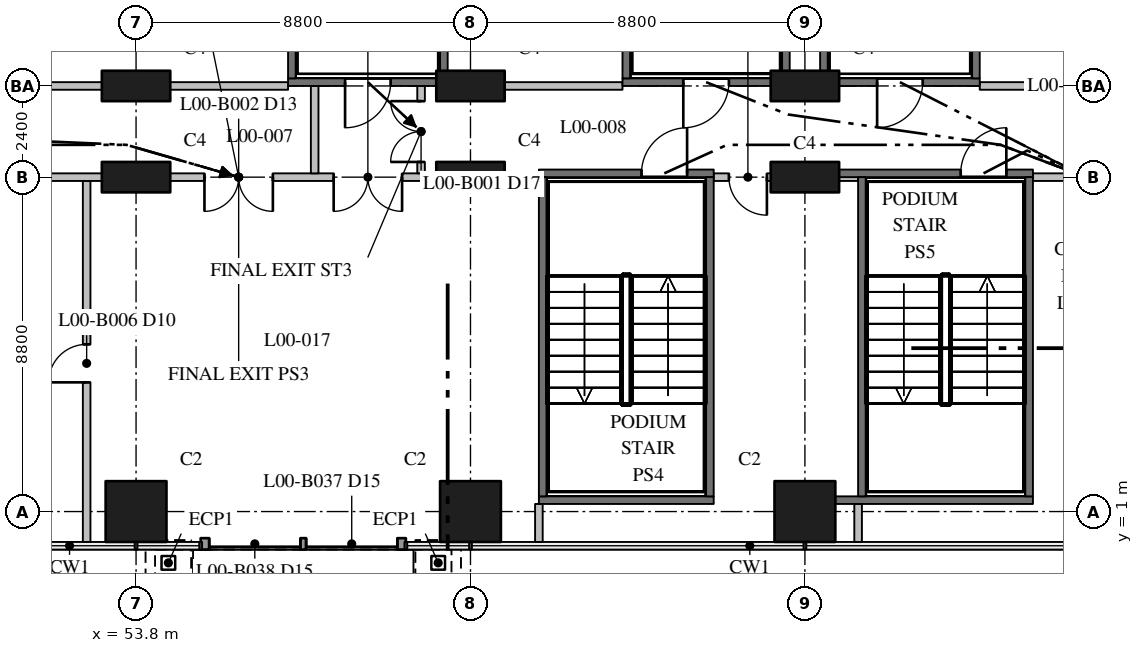
"""IFC4 building model, lengths in metres.
Left out: names, types, materials, properties, quantities, classifications, styles, units other than length and angle.
Written with IfcOpenShell. Run it as: python <this file> out.ifc"""

import sys

from ifc_helpers import new_model, si_unit, direction, frame, frame_2d, origin, origin_2d, place, context, subcontext, project, spatial, rectangle, hollow_rectangle, extrude, element, fill, save


model = new_model("IFC4")
c1 = context("Model", 3, precision=1e-05, world=origin(), true_north=direction((0.0, 1.0)))
c2 = subcontext(c1, "Body", "Model", "MODEL_VIEW")
j1 = project(units=[si_unit("LENGTHUNIT", "METRE"), si_unit("PLANEANGLEUNIT", "RADIAN")], contexts=[c1])
p1 = place(None, origin())
s1 = spatial("IfcSite", under=j1, at=p1, CompositionType="ELEMENT")
p2 = place(p1, origin())
s2 = spatial("IfcBuilding", under=s1, at=p2, CompositionType="ELEMENT")
p3 = place(p2, origin())
s3 = spatial("IfcBuildingStorey", under=s2, at=p3, CompositionType="ELEMENT", Elevation=0.0)
p4 = place(p3, frame((53.8, 1.0, 0.0), z_axis=(0.0, 0.0, 1.0), x_axis=(1.0, 0.0, 0.0)))
e1 = element("IfcColumn", 1, at=p4, inside=s3, PredefinedType="COLUMN", context=c2, shape_type="SweptSolid", body=[
    extrude(rectangle(XDim=1.6, YDim=1.6, at=origin_2d()), origin(), (0.0, 0.0, 1.0), 7.5),
])
for number, where, z_axis, x_axis in (
    (2, (53.8, 9.8, 0.0), (0.0, 0.0, 1.0), (1.0, 0.0, 0.0)),
    (3, (53.8, 12.2, 0.0), (0.0, 0.0, 1.0), (1.0, 0.0, 0.0)),
):
    element("IfcColumn", number, at=place(p3, frame(where, z_axis=z_axis, x_axis=x_axis)), inside=s3, PredefinedType="COLUMN", context=c2, shape_type="SweptSolid", body=[
        extrude(rectangle(XDim=1.8, YDim=0.8, at=origin_2d()), origin(), (0.0, 0.0, 1.0), 7.5),
    ])
p5 = place(p3, frame((62.6, 1.0, 0.0), z_axis=(0.0, 0.0, 1.0), x_axis=(1.0, 0.0, 0.0)))
e4 = element("IfcColumn", 4, at=p5, inside=s3, PredefinedType="COLUMN", context=c2, shape_type="SweptSolid", body=[
    extrude(rectangle(XDim=1.6, YDim=1.6, at=origin_2d()), origin(), (0.0, 0.0, 1.0), 7.5),
])
for number, where, z_axis, x_axis in (
    (5, (62.6, 9.8, 0.0), (0.0, 0.0, 1.0), (1.0, 0.0, 0.0)),
    (6, (62.6, 12.2, 0.0), (0.0, 0.0, 1.0), (1.0, 0.0, 0.0)),
):
    element("IfcColumn", number, at=place(p3, frame(where, z_axis=z_axis, x_axis=x_axis)), inside=s3, PredefinedType="COLUMN", context=c2, shape_type="SweptSolid", body=[
        extrude(rectangle(XDim=1.8, YDim=0.8, at=origin_2d()), origin(), (0.0, 0.0, 1.0), 7.5),
    ])
p6 = place(p3, frame((71.4, 1.0, 0.0), z_axis=(0.0, 0.0, 1.0), x_axis=(1.0, 0.0, 0.0)))
e7 = element("IfcColumn", 7, at=p6, inside=s3, PredefinedType="COLUMN", context=c2, shape_type="SweptSolid", body=[
    extrude(rectangle(XDim=1.6, YDim=1.6, at=origin_2d()), origin(), (0.0, 0.0, 1.0), 7.5),
])
for number, where, z_axis, x_axis in (
    (8, (71.4, 9.8, 0.0), (0.0, 0.0, 1.0), (1.0, 0.0, 0.0)),
    (9, (71.4, 12.2, 0.0), (0.0, 0.0, 1.0), (1.0, 0.0, 0.0)),
):
    element("IfcColumn", number, at=place(p3, frame(where, z_axis=z_axis, x_axis=x_axis)), inside=s3, PredefinedType="COLUMN", context=c2, shape_type="SweptSolid", body=[
        extrude(rectangle(XDim=1.8, YDim=0.8, at=origin_2d()), origin(), (0.0, 0.0, 1.0), 7.5),
    ])
for number, where, z_axis, x_axis in (
    (10, (54.65, -0.35, 0.0), (0.0, 0.0, 1.0), (1.0, 0.0, 0.0)),
    (11, (61.75, -0.35, 0.0), (0.0, 0.0, 1.0), (1.0, 0.0, 0.0)),
):
    element("IfcColumn", number, at=place(p3, frame(where, z_axis=z_axis, x_axis=x_axis)), inside=s3, PredefinedType="COLUMN", context=c2, shape_type="SweptSolid", body=[
        extrude(hollow_rectangle(XDim=0.356, YDim=0.356, WallThickness=0.013, at=origin_2d()), origin(), (0.0, 0.0, 1.0), 7.1),
    ])
p7 = place(p3, frame((57.8, 12.3, 0.0), z_axis=(0.0, 0.0, 1.0), x_axis=(1.0, 0.0, 0.0)))
e12 = element("IfcWall", 12, at=p7, inside=s3, PredefinedType="SHEAR", context=c2, shape_type="SweptSolid", body=[
    extrude(rectangle(XDim=4.2, YDim=0.2, at=frame_2d((2.1, 0.0))), origin(), (0.0, 0.0, 1.0), 7.1),
])
p8 = place(p7, frame((1.5, 0.0, 0.0)))
e13 = element("IfcOpeningElement", 13, at=p8, cuts=e12, PredefinedType="OPENING", context=c2, shape_type="SweptSolid", body=[
    extrude(rectangle(XDim=1.2, YDim=2.1, at=frame_2d((0.6, 1.05))), frame((0.0, 0.11, 0.0), z_axis=(0.0, -1.0, 0.0), x_axis=(1.0, 0.0, 0.0)), (0.0, 0.0, 1.0), 0.22),
])
p9 = place(p3, frame((57.9, 12.4, 0.0), z_axis=(0.0, 0.0, 1.0), x_axis=(0.0, 1.0, 0.0)))
e14 = element("IfcWall", 14, at=p9, inside=s3, PredefinedType="SHEAR", context=c2, shape_type="SweptSolid", body=[
    extrude(rectangle(XDim=7.2, YDim=0.2, at=frame_2d((3.6, 0.0))), origin(), (0.0, 0.0, 1.0), 7.1),
])
p10 = place(p3, frame((61.9, 12.4, 0.0), z_axis=(0.0, 0.0, 1.0), x_axis=(0.0, 1.0, 0.0)))
e15 = element("IfcWall", 15, at=p10, inside=s3, PredefinedType="SHEAR", context=c2, shape_type="SweptSolid", body=[
    extrude(rectangle(XDim=7.8, YDim=0.2, at=frame_2d((3.9, 0.0))), origin(), (0.0, 0.0, 1.0), 7.1),
])
p11 = place(p3, frame((71.8, 12.3, 0.0), z_axis=(0.0, 0.0, 1.0), x_axis=(1.0, 0.0, 0.0)))
e16 = element("IfcWall", 16, at=p11, inside=s3, PredefinedType="SHEAR", context=c2, shape_type="SweptSolid", body=[
    extrude(rectangle(XDim=4.2, YDim=0.2, at=frame_2d((2.1, 0.0))), origin(), (0.0, 0.0, 1.0), 7.1),
])
p12 = place(p11, frame((1.5, 0.0, 0.0)))
e17 = element("IfcOpeningElement", 17, at=p12, cuts=e16, PredefinedType="OPENING", context=c2, shape_type="SweptSolid", body=[
    extrude(rectangle(XDim=1.2, YDim=2.1, at=frame_2d((0.6, 1.05))), frame((0.0, 0.11, 0.0), z_axis=(0.0, -1.0, 0.0), x_axis=(1.0, 0.0, 0.0)), (0.0, 0.0, 1.0), 0.22),
])
p13 = place(p3, frame((71.9, 12.4, 0.0), z_axis=(0.0, 0.0, 1.0), x_axis=(0.0, 1.0, 0.0)))
e18 = element("IfcWall", 18, at=p13, inside=s3, PredefinedType="SHEAR", context=c2, shape_type="SweptSolid", body=[
    extrude(rectangle(XDim=7.8, YDim=0.2, at=frame_2d((3.9, 0.0))), origin(), (0.0, 0.0, 1.0), 7.1),
])
p14 = place(p3, frame((75.9, 12.4, 0.0), z_axis=(0.0, 0.0, 1.0), x_axis=(0.0, 1.0, 0.0)))
e19 = element("IfcWall", 19, at=p14, inside=s3, PredefinedType="SHEAR", context=c2, shape_type="SweptSolid", body=[
    extrude(rectangle(XDim=7.2, YDim=0.2, at=frame_2d((3.6, 0.0))), origin(), (0.0, 0.0, 1.0), 7.1),
])
p15 = place(p3, frame((66.6, 12.3, 0.0), z_axis=(0.0, 0.0, 1.0), x_axis=(1.0, 0.0, 0.0)))
e20 = element("IfcWall", 20, at=p15, inside=s3, PredefinedType="SHEAR", context=c2, shape_type="SweptSolid", body=[
    extrude(rectangle(XDim=4.4, YDim=0.2, at=frame_2d((2.2, 0.0))), origin(), (0.0, 0.0, 1.0), 7.1),
])
p16 = place(p15, frame((1.6, 0.0, 0.0)))
e21 = element("IfcOpeningElement", 21, at=p16, cuts=e20, PredefinedType="OPENING", context=c2, shape_type="SweptSolid", body=[
    extrude(rectangle(XDim=1.2, YDim=2.1, at=frame_2d((0.6, 1.05))), frame((0.0, 0.11, 0.0), z_axis=(0.0, -1.0, 0.0), x_axis=(1.0, 0.0, 0.0)), (0.0, 0.0, 1.0), 0.22),
])
for number, where, z_axis, x_axis in (
    (22, (66.7, 12.4, 0.0), (0.0, 0.0, 1.0), (0.0, 1.0, 0.0)),
    (23, (70.9, 12.4, 0.0), (0.0, 0.0, 1.0), (0.0, 1.0, 0.0)),
):
    element("IfcWall", number, at=place(p3, frame(where, z_axis=z_axis, x_axis=x_axis)), inside=s3, PredefinedType="SHEAR", context=c2, shape_type="SweptSolid", body=[
        extrude(rectangle(XDim=8.4, YDim=0.2, at=frame_2d((4.2, 0.0))), origin(), (0.0, 0.0, 1.0), 7.1),
    ])
p17 = place(p3, frame((64.4, 9.9, 0.0), z_axis=(0.0, 0.0, 1.0), x_axis=(1.0, 0.0, 0.0)))
e24 = element("IfcWall", 24, at=p17, inside=s3, PredefinedType="SHEAR", context=c2, shape_type="SweptSolid", body=[
    extrude(rectangle(XDim=4.6, YDim=0.2, at=frame_2d((2.3, 0.0))), origin(), (0.0, 0.0, 1.0), 7.1),
])
p18 = place(p17, frame((2.7, 0.0, 0.0)))
e25 = element("IfcOpeningElement", 25, at=p18, cuts=e24, PredefinedType="OPENING", context=c2, shape_type="SweptSolid", body=[
    extrude(rectangle(XDim=1.2, YDim=2.1, at=frame_2d((0.6, 1.05))), frame((0.0, 0.11, 0.0), z_axis=(0.0, -1.0, 0.0), x_axis=(1.0, 0.0, 0.0)), (0.0, 0.0, 1.0), 0.22),
])
p19 = place(p3, frame((64.4, 1.3, 0.0), z_axis=(0.0, 0.0, 1.0), x_axis=(1.0, 0.0, 0.0)))
e26 = element("IfcWall", 26, at=p19, inside=s3, PredefinedType="SHEAR", context=c2, shape_type="SweptSolid", body=[
    extrude(rectangle(XDim=4.6, YDim=0.2, at=frame_2d((2.3, 0.0))), origin(), (0.0, 0.0, 1.0), 7.1),
])
for number, where, z_axis, x_axis in (
    (27, (64.5, 1.4, 0.0), (0.0, 0.0, 1.0), (0.0, 1.0, 0.0)),
    (28, (68.9, 1.4, 0.0), (0.0, 0.0, 1.0), (0.0, 1.0, 0.0)),
):
    element("IfcWall", number, at=place(p3, frame(where, z_axis=z_axis, x_axis=x_axis)), inside=s3, PredefinedType="SHEAR", context=c2, shape_type="SweptSolid", body=[
        extrude(rectangle(XDim=8.4, YDim=0.2, at=frame_2d((4.2, 0.0))), origin(), (0.0, 0.0, 1.0), 7.1),
    ])
p20 = place(p3, frame((72.3, 9.9, 0.0), z_axis=(0.0, 0.0, 1.0), x_axis=(1.0, 0.0, 0.0)))
e29 = element("IfcWall", 29, at=p20, inside=s3, PredefinedType="SHEAR", context=c2, shape_type="SweptSolid", body=[
    extrude(rectangle(XDim=5.1, YDim=0.2, at=frame_2d((2.55, 0.0))), origin(), (0.0, 0.0, 1.0), 7.1),
])
p21 = place(p20, frame((3.2, 0.0, 0.0)))
e30 = element("IfcOpeningElement", 30, at=p21, cuts=e29, PredefinedType="OPENING", context=c2, shape_type="SweptSolid", body=[
    extrude(rectangle(XDim=1.2, YDim=2.1, at=frame_2d((0.6, 1.05))), frame((0.0, 0.11, 0.0), z_axis=(0.0, -1.0, 0.0), x_axis=(1.0, 0.0, 0.0)), (0.0, 0.0, 1.0), 0.22),
])
p22 = place(p3, frame((72.2, 1.3, 0.0), z_axis=(0.0, 0.0, 1.0), x_axis=(1.0, 0.0, 0.0)))
e31 = element("IfcWall", 31, at=p22, inside=s3, PredefinedType="SHEAR", context=c2, shape_type="SweptSolid", body=[
    extrude(rectangle(XDim=5.2, YDim=0.2, at=frame_2d((2.6, 0.0))), origin(), (0.0, 0.0, 1.0), 7.1),
])
for number, where, z_axis, x_axis in (
    (32, (72.9, 1.4, 0.0), (0.0, 0.0, 1.0), (0.0, 1.0, 0.0)),
    (33, (77.3, 1.4, 0.0), (0.0, 0.0, 1.0), (0.0, 1.0, 0.0)),
):
    element("IfcWall", number, at=place(p3, frame(where, z_axis=z_axis, x_axis=x_axis)), inside=s3, PredefinedType="SHEAR", context=c2, shape_type="SweptSolid", body=[
        extrude(rectangle(XDim=8.4, YDim=0.2, at=frame_2d((4.2, 0.0))), origin(), (0.0, 0.0, 1.0), 7.1),
    ])
p23 = place(p3, frame((45.0, 9.8, 0.0), z_axis=(0.0, 0.0, 1.0), x_axis=(1.0, 0.0, 0.0)))
e34 = element("IfcWall", 34, at=p23, inside=s3, PredefinedType="PARTITIONING", context=c2, shape_type="SweptSolid", body=[
    extrude(rectangle(XDim=19.4, YDim=0.2, at=frame_2d((9.7, 0.0))), origin(), (0.0, 0.0, 1.0), 7.1),
])
p24 = place(p23, frame((10.6, 0.0, 0.0)))
e35 = element("IfcOpeningElement", 35, at=p24, cuts=e34, PredefinedType="OPENING", context=c2, shape_type="SweptSolid", body=[
    extrude(rectangle(XDim=1.8, YDim=2.1, at=frame_2d((0.9, 1.05))), frame((0.0, 0.11, 0.0), z_axis=(0.0, -1.0, 0.0), x_axis=(1.0, 0.0, 0.0)), (0.0, 0.0, 1.0), 0.22),
])
p25 = place(p23, frame((14.0, 0.0, 0.0)))
e36 = element("IfcOpeningElement", 36, at=p25, cuts=e34, PredefinedType="OPENING", context=c2, shape_type="SweptSolid", body=[
    extrude(rectangle(XDim=1.8, YDim=2.1, at=frame_2d((0.9, 1.05))), frame((0.0, 0.11, 0.0), z_axis=(0.0, -1.0, 0.0), x_axis=(1.0, 0.0, 0.0)), (0.0, 0.0, 1.0), 0.22),
])
p26 = place(p3, frame((69.0, 9.8, 0.0), z_axis=(0.0, 0.0, 1.0), x_axis=(1.0, 0.0, 0.0)))
e37 = element("IfcWall", 37, at=p26, inside=s3, PredefinedType="PARTITIONING", context=c2, shape_type="SweptSolid", body=[
    extrude(rectangle(XDim=3.8, YDim=0.2, at=frame_2d((1.9, 0.0))), origin(), (0.0, 0.0, 1.0), 7.1),
])
p27 = place(p26, frame((0.4, 0.0, 0.0)))
e38 = element("IfcOpeningElement", 38, at=p27, cuts=e37, PredefinedType="OPENING", context=c2, shape_type="SweptSolid", body=[
    extrude(rectangle(XDim=1.0, YDim=2.1, at=frame_2d((0.5, 1.05))), frame((0.0, 0.11, 0.0), z_axis=(0.0, -1.0, 0.0), x_axis=(1.0, 0.0, 0.0)), (0.0, 0.0, 1.0), 0.22),
])
p28 = place(p3, frame((77.4, 9.8, 0.0), z_axis=(0.0, 0.0, 1.0), x_axis=(1.0, 0.0, 0.0)))
e39 = element("IfcWall", 39, at=p28, inside=s3, PredefinedType="PARTITIONING", context=c2, shape_type="SweptSolid", body=[
    extrude(rectangle(XDim=3.6, YDim=0.2, at=frame_2d((1.8, 0.0))), origin(), (0.0, 0.0, 1.0), 7.1),
])
p29 = place(p28, frame((0.9, 0.0, 0.0)))
e40 = element("IfcOpeningElement", 40, at=p29, cuts=e39, PredefinedType="OPENING", context=c2, shape_type="SweptSolid", body=[
    extrude(rectangle(XDim=1.0, YDim=2.1, at=frame_2d((0.5, 1.05))), frame((0.0, 0.11, 0.0), z_axis=(0.0, -1.0, 0.0), x_axis=(1.0, 0.0, 0.0)), (0.0, 0.0, 1.0), 0.22),
])
p30 = place(p3, frame((35.4, 12.2, 0.0), z_axis=(0.0, 0.0, 1.0), x_axis=(1.0, 0.0, 0.0)))
e41 = element("IfcWall", 41, at=p30, inside=s3, PredefinedType="PARTITIONING", context=c2, shape_type="SweptSolid", body=[
    extrude(rectangle(XDim=22.4, YDim=0.2, at=frame_2d((11.2, 0.0))), origin(), (0.0, 0.0, 1.0), 7.1),
])
p31 = place(p3, frame((62.0, 12.2, 0.0), z_axis=(0.0, 0.0, 1.0), x_axis=(1.0, 0.0, 0.0)))
e42 = element("IfcWall", 42, at=p31, inside=s3, PredefinedType="PARTITIONING", context=c2, shape_type="SweptSolid", body=[
    extrude(rectangle(XDim=4.6, YDim=0.2, at=frame_2d((2.3, 0.0))), origin(), (0.0, 0.0, 1.0), 7.1),
])
p32 = place(p3, frame((71.0, 12.2, 0.0), z_axis=(0.0, 0.0, 1.0), x_axis=(1.0, 0.0, 0.0)))
e43 = element("IfcWall", 43, at=p32, inside=s3, PredefinedType="PARTITIONING", context=c2, shape_type="SweptSolid", body=[
    extrude(rectangle(XDim=0.8, YDim=0.2, at=frame_2d((0.4, 0.0))), origin(), (0.0, 0.0, 1.0), 7.1),
])
p33 = place(p3, frame((76.0, 12.2, 0.0), z_axis=(0.0, 0.0, 1.0), x_axis=(1.0, 0.0, 0.0)))
e44 = element("IfcWall", 44, at=p33, inside=s3, PredefinedType="PARTITIONING", context=c2, shape_type="SweptSolid", body=[
    extrude(rectangle(XDim=5.0, YDim=0.2, at=frame_2d((2.5, 0.0))), origin(), (0.0, 0.0, 1.0), 7.1),
])
p34 = place(p3, frame((58.5, 9.9, 0.0), z_axis=(0.0, 0.0, 1.0), x_axis=(0.0, 1.0, 0.0)))
e45 = element("IfcWall", 45, at=p34, inside=s3, PredefinedType="PARTITIONING", context=c2, shape_type="SweptSolid", body=[
    extrude(rectangle(XDim=2.3, YDim=0.2, at=frame_2d((1.15, 0.0))), origin(), (0.0, 0.0, 1.0), 7.1),
])
p35 = place(p3, frame((61.3, 9.9, 0.0), z_axis=(0.0, 0.0, 1.0), x_axis=(0.0, 1.0, 0.0)))
e46 = element("IfcWall", 46, at=p35, inside=s3, PredefinedType="PARTITIONING", context=c2, shape_type="SweptSolid", body=[
    extrude(rectangle(XDim=2.3, YDim=0.2, at=frame_2d((1.15, 0.0))), origin(), (0.0, 0.0, 1.0), 7.1),
])
p36 = place(p35, frame((0.3, 0.0, 0.0)))
e47 = element("IfcOpeningElement", 47, at=p36, cuts=e46, PredefinedType="OPENING", context=c2, shape_type="SweptSolid", body=[
    extrude(rectangle(XDim=1.6, YDim=2.1, at=frame_2d((0.8, 1.05))), frame((0.0, 0.11, 0.0), z_axis=(0.0, -1.0, 0.0), x_axis=(1.0, 0.0, 0.0)), (0.0, 0.0, 1.0), 0.22),
])
p37 = place(p3, frame((52.5, 0.2, 0.0), z_axis=(0.0, 0.0, 1.0), x_axis=(0.0, 1.0, 0.0)))
e48 = element("IfcWall", 48, at=p37, inside=s3, PredefinedType="PARTITIONING", context=c2, shape_type="SweptSolid", body=[
    extrude(rectangle(XDim=9.5, YDim=0.2, at=frame_2d((4.75, 0.0))), origin(), (0.0, 0.0, 1.0), 7.1),
])
p38 = place(p37, frame((4.2, 0.0, 0.0)))
e49 = element("IfcOpeningElement", 49, at=p38, cuts=e48, PredefinedType="OPENING", context=c2, shape_type="SweptSolid", body=[
    extrude(rectangle(XDim=1.0, YDim=2.1, at=frame_2d((0.5, 1.05))), frame((0.0, 0.11, 0.0), z_axis=(0.0, -1.0, 0.0), x_axis=(1.0, 0.0, 0.0)), (0.0, 0.0, 1.0), 0.22),
])
for number, where, z_axis, x_axis in (
    (50, (64.4, 0.2, 0.0), (0.0, 0.0, 1.0), (0.0, 1.0, 0.0)),
    (51, (72.8, 0.2, 0.0), (0.0, 0.0, 1.0), (0.0, 1.0, 0.0)),
):
    element("IfcWall", number, at=place(p3, frame(where, z_axis=z_axis, x_axis=x_axis)), inside=s3, PredefinedType="PARTITIONING", context=c2, shape_type="SweptSolid", body=[
        extrude(rectangle(XDim=1.0, YDim=0.2, at=frame_2d((0.5, 0.0))), origin(), (0.0, 0.0, 1.0), 7.1),
    ])
p39 = place(p3, frame((60.9, 0.15, 0.0), z_axis=(0.0, 0.0, 1.0), x_axis=(-1.0, 0.0, 0.0)))
e52 = element("IfcWall", 52, at=p39, inside=s3, PredefinedType="STANDARD", context=c2, shape_type="SweptSolid", body=[
    extrude(rectangle(XDim=5.4, YDim=0.3, at=frame_2d((2.7, 0.0))), origin(), (0.0, 0.0, 1.0), 7.1),
])
p40 = place(p39, frame((0.225, 0.0, 0.0)))
e53 = element("IfcOpeningElement", 53, at=p40, cuts=e52, PredefinedType="OPENING", context=c2, shape_type="SweptSolid", body=[
    extrude(rectangle(XDim=2.4, YDim=2.4, at=frame_2d((1.2, 1.2))), frame((0.0, 0.16, 0.0), z_axis=(0.0, -1.0, 0.0), x_axis=(1.0, 0.0, 0.0)), (0.0, 0.0, 1.0), 0.32),
])
p41 = place(p39, frame((2.775, 0.0, 0.0)))
e54 = element("IfcOpeningElement", 54, at=p41, cuts=e52, PredefinedType="OPENING", context=c2, shape_type="SweptSolid", body=[
    extrude(rectangle(XDim=2.4, YDim=2.4, at=frame_2d((1.2, 1.2))), frame((0.0, 0.16, 0.0), z_axis=(0.0, -1.0, 0.0), x_axis=(1.0, 0.0, 0.0)), (0.0, 0.0, 1.0), 0.32),
])
p42 = place(p8, frame((1.2, 0.0, 0.0), z_axis=(0.0, 0.0, 1.0), x_axis=(-1.0, 0.0, 0.0)))
e55 = element("IfcDoor", 55, at=p42, inside=s3, OperationType="SINGLE_SWING_LEFT", PredefinedType="DOOR", context=c2, shape_type="SweptSolid", body=[
    extrude(rectangle(XDim=1.2, YDim=2.1, at=frame_2d((0.6, 1.05))), frame((0.0, 0.025, 0.0), z_axis=(0.0, -1.0, 0.0), x_axis=(1.0, 0.0, 0.0)), (0.0, 0.0, 1.0), 0.05),
])
fill(e13, e55)
p43 = place(p12, frame((1.2, 0.0, 0.0), z_axis=(0.0, 0.0, 1.0), x_axis=(-1.0, 0.0, 0.0)))
e56 = element("IfcDoor", 56, at=p43, inside=s3, OperationType="SINGLE_SWING_LEFT", PredefinedType="DOOR", context=c2, shape_type="SweptSolid", body=[
    extrude(rectangle(XDim=1.2, YDim=2.1, at=frame_2d((0.6, 1.05))), frame((0.0, 0.025, 0.0), z_axis=(0.0, -1.0, 0.0), x_axis=(1.0, 0.0, 0.0)), (0.0, 0.0, 1.0), 0.05),
])
fill(e17, e56)
p44 = place(p16, frame((1.2, 0.0, 0.0), z_axis=(0.0, 0.0, 1.0), x_axis=(-1.0, 0.0, 0.0)))
e57 = element("IfcDoor", 57, at=p44, inside=s3, OperationType="SINGLE_SWING_LEFT", PredefinedType="DOOR", context=c2, shape_type="SweptSolid", body=[
    extrude(rectangle(XDim=1.2, YDim=2.1, at=frame_2d((0.6, 1.05))), frame((0.0, 0.025, 0.0), z_axis=(0.0, -1.0, 0.0), x_axis=(1.0, 0.0, 0.0)), (0.0, 0.0, 1.0), 0.05),
])
fill(e21, e57)
p45 = place(p18, origin())
e58 = element("IfcDoor", 58, at=p45, inside=s3, OperationType="SINGLE_SWING_RIGHT", PredefinedType="DOOR", context=c2, shape_type="SweptSolid", body=[
    extrude(rectangle(XDim=1.2, YDim=2.1, at=frame_2d((0.6, 1.05))), frame((0.0, 0.025, 0.0), z_axis=(0.0, -1.0, 0.0), x_axis=(1.0, 0.0, 0.0)), (0.0, 0.0, 1.0), 0.05),
])
fill(e25, e58)
p46 = place(p21, origin())
e59 = element("IfcDoor", 59, at=p46, inside=s3, OperationType="SINGLE_SWING_RIGHT", PredefinedType="DOOR", context=c2, shape_type="SweptSolid", body=[
    extrude(rectangle(XDim=1.2, YDim=2.1, at=frame_2d((0.6, 1.05))), frame((0.0, 0.025, 0.0), z_axis=(0.0, -1.0, 0.0), x_axis=(1.0, 0.0, 0.0)), (0.0, 0.0, 1.0), 0.05),
])
fill(e30, e59)
p47 = place(p36, origin())
e60 = element("IfcDoor", 60, at=p47, inside=s3, OperationType="DOUBLE_DOOR_SINGLE_SWING", PredefinedType="DOOR", context=c2, shape_type="SweptSolid", body=[
    extrude(rectangle(XDim=1.6, YDim=2.1, at=frame_2d((0.8, 1.05))), frame((0.0, 0.025, 0.0), z_axis=(0.0, -1.0, 0.0), x_axis=(1.0, 0.0, 0.0)), (0.0, 0.0, 1.0), 0.05),
])
fill(e47, e60)
p48 = place(p24, frame((1.8, 0.0, 0.0), z_axis=(0.0, 0.0, 1.0), x_axis=(-1.0, 0.0, 0.0)))
e61 = element("IfcDoor", 61, at=p48, inside=s3, OperationType="DOUBLE_DOOR_SINGLE_SWING", PredefinedType="DOOR", context=c2, shape_type="SweptSolid", body=[
    extrude(rectangle(XDim=1.8, YDim=2.1, at=frame_2d((0.9, 1.05))), frame((0.0, 0.025, 0.0), z_axis=(0.0, -1.0, 0.0), x_axis=(1.0, 0.0, 0.0)), (0.0, 0.0, 1.0), 0.05),
])
fill(e35, e61)
p49 = place(p25, frame((1.8, 0.0, 0.0), z_axis=(0.0, 0.0, 1.0), x_axis=(-1.0, 0.0, 0.0)))
e62 = element("IfcDoor", 62, at=p49, inside=s3, OperationType="DOUBLE_DOOR_SINGLE_SWING", PredefinedType="DOOR", context=c2, shape_type="SweptSolid", body=[
    extrude(rectangle(XDim=1.8, YDim=2.1, at=frame_2d((0.9, 1.05))), frame((0.0, 0.025, 0.0), z_axis=(0.0, -1.0, 0.0), x_axis=(1.0, 0.0, 0.0)), (0.0, 0.0, 1.0), 0.05),
])
fill(e36, e62)
p50 = place(p38, origin())
e63 = element("IfcDoor", 63, at=p50, inside=s3, OperationType="SINGLE_SWING_LEFT", PredefinedType="DOOR", context=c2, shape_type="SweptSolid", body=[
    extrude(rectangle(XDim=1.0, YDim=2.1, at=frame_2d((0.5, 1.05))), frame((0.0, 0.025, 0.0), z_axis=(0.0, -1.0, 0.0), x_axis=(1.0, 0.0, 0.0)), (0.0, 0.0, 1.0), 0.05),
])
fill(e49, e63)
p51 = place(p27, frame((1.0, 0.0, 0.0), z_axis=(0.0, 0.0, 1.0), x_axis=(-1.0, 0.0, 0.0)))
e64 = element("IfcDoor", 64, at=p51, inside=s3, OperationType="SINGLE_SWING_RIGHT", PredefinedType="DOOR", context=c2, shape_type="SweptSolid", body=[
    extrude(rectangle(XDim=1.0, YDim=2.1, at=frame_2d((0.5, 1.05))), frame((0.0, 0.025, 0.0), z_axis=(0.0, -1.0, 0.0), x_axis=(1.0, 0.0, 0.0)), (0.0, 0.0, 1.0), 0.05),
])
fill(e38, e64)
p52 = place(p40, origin())
e65 = element("IfcDoor", 65, at=p52, inside=s3, OperationType="DOUBLE_DOOR_SLIDING", PredefinedType="DOOR", context=c2, shape_type="SweptSolid", body=[
    extrude(rectangle(XDim=2.4, YDim=2.4, at=frame_2d((1.2, 1.2))), frame((0.0, 0.025, 0.0), z_axis=(0.0, -1.0, 0.0), x_axis=(1.0, 0.0, 0.0)), (0.0, 0.0, 1.0), 0.05),
])
fill(e53, e65)
p53 = place(p41, origin())
e66 = element("IfcDoor", 66, at=p53, inside=s3, OperationType="DOUBLE_DOOR_SLIDING", PredefinedType="DOOR", context=c2, shape_type="SweptSolid", body=[
    extrude(rectangle(XDim=2.4, YDim=2.4, at=frame_2d((1.2, 1.2))), frame((0.0, 0.025, 0.0), z_axis=(0.0, -1.0, 0.0), x_axis=(1.0, 0.0, 0.0)), (0.0, 0.0, 1.0), 0.05),
])
fill(e54, e66)
save(model, sys.argv[1])
